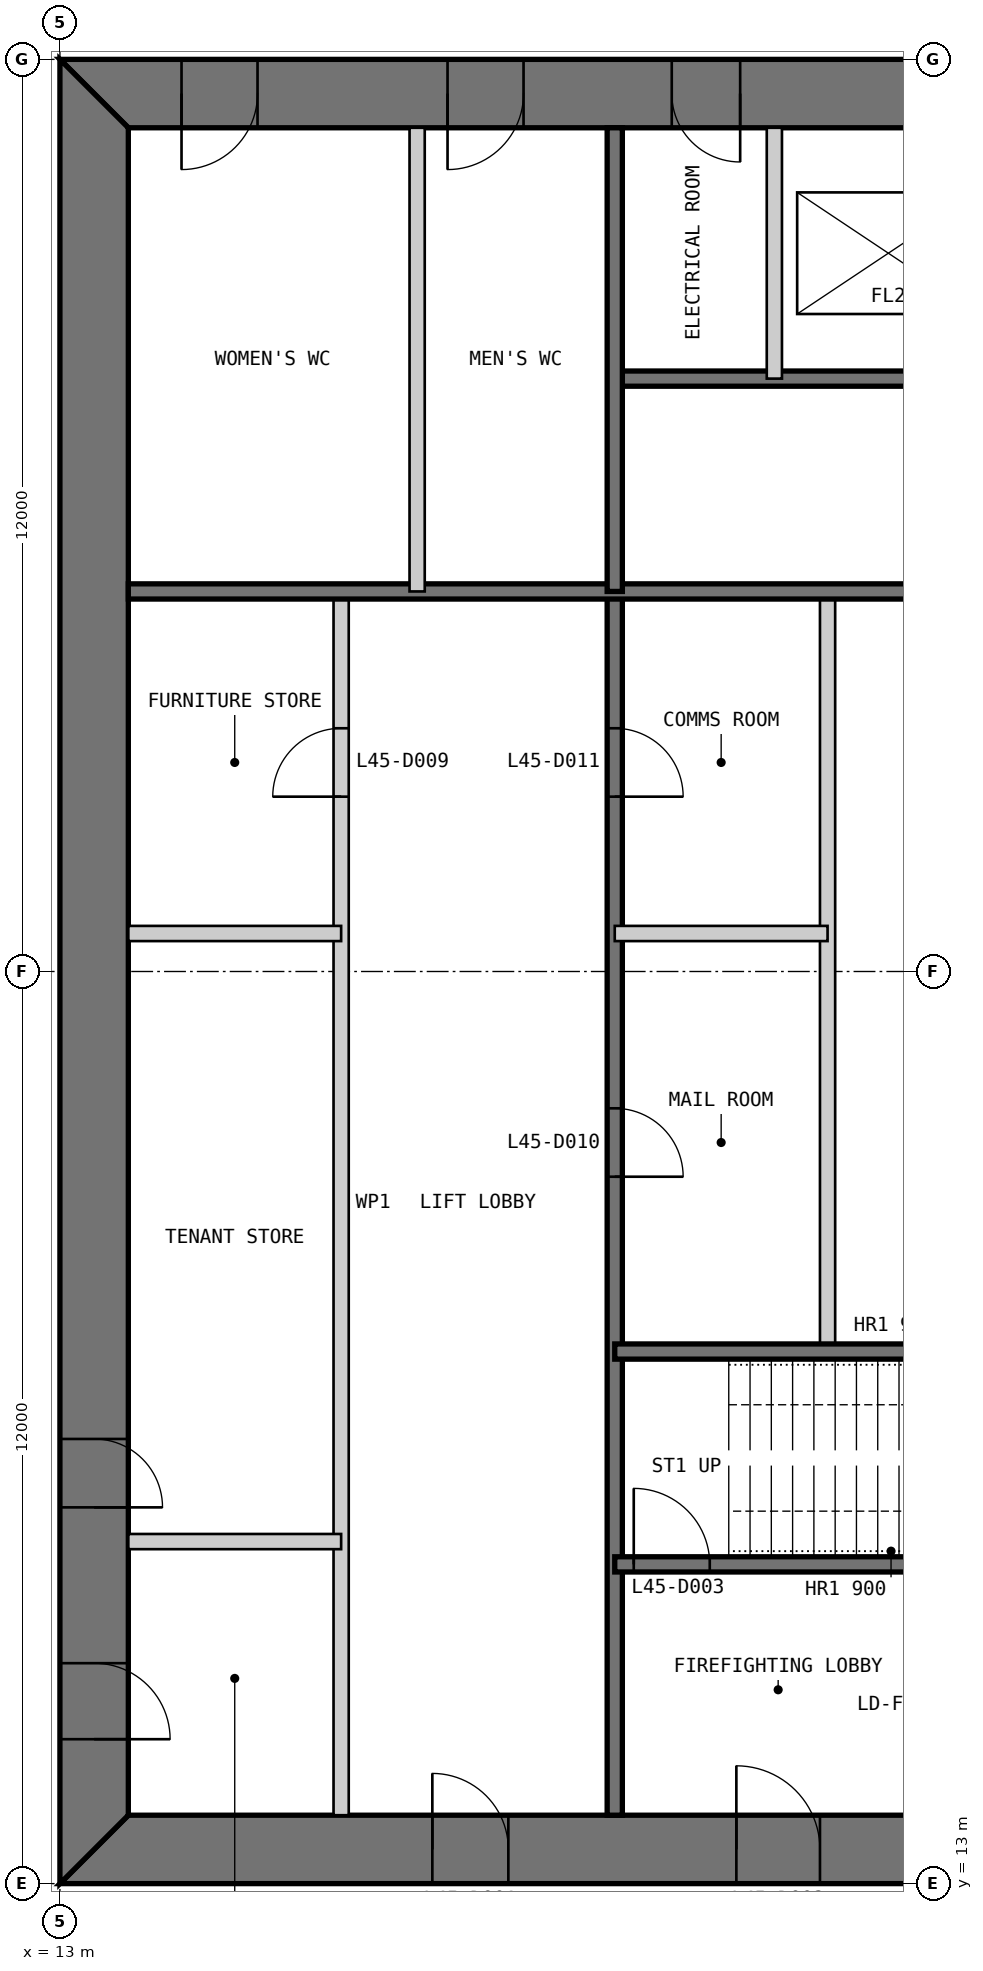
"""IFC4 building model, lengths in metres.
Left out: names, types, materials, properties, quantities, classifications, styles, units other than length and angle.
Written with IfcOpenShell. Run it as: python <this file> out.ifc"""

import sys

from ifc_helpers import new_model, si_unit, direction, frame, frame_2d, origin, place, context, subcontext, project, spatial, polyline, rectangle, outline, extrude, element, fill, save


model = new_model("IFC4")
c1 = context("Model", 3, precision=1e-05, world=origin(), true_north=direction((0.0, 1.0)))
c2 = subcontext(c1, "Body", "Model", "MODEL_VIEW")
j1 = project(units=[si_unit("LENGTHUNIT", "METRE"), si_unit("PLANEANGLEUNIT", "RADIAN")], contexts=[c1])
p1 = place(None, origin())
s1 = spatial("IfcSite", under=j1, at=p1, CompositionType="ELEMENT")
p2 = place(p1, origin())
s2 = spatial("IfcBuilding", under=s1, at=p2, CompositionType="ELEMENT")
p3 = place(p2, frame((0.0, 0.0, 193.8)))
s3 = spatial("IfcBuildingStorey", under=s2, at=p3, CompositionType="ELEMENT", Elevation=193.8)
p4 = place(p3, frame((13.0, 13.45, 0.0), z_axis=(0.0, 0.0, 1.0), x_axis=(1.0, 0.0, 0.0)))
e1 = element("IfcWall", 1, at=p4, inside=s3, PredefinedType="SHEAR", context=c2, shape_type="SweptSolid", body=[
    extrude(outline(polyline([(0.0, -0.45), (24.0, -0.45), (23.1, 0.45), (0.9, 0.45), (0.0, -0.45)])), origin(), (0.0, 0.0, 1.0), 4.0),
])
p5 = place(p4, frame((4.9, 0.0, 0.0)))
e2 = element("IfcOpeningElement", 2, at=p5, cuts=e1, PredefinedType="OPENING", context=c2, shape_type="SweptSolid", body=[
    extrude(rectangle(XDim=1.0, YDim=2.2, at=frame_2d((0.5, 1.1))), frame((0.0, 0.46, 0.0), z_axis=(0.0, -1.0, 0.0), x_axis=(1.0, 0.0, 0.0)), (0.0, 0.0, 1.0), 0.92),
])
p6 = place(p4, frame((8.9, 0.0, 0.0)))
e3 = element("IfcOpeningElement", 3, at=p6, cuts=e1, PredefinedType="OPENING", context=c2, shape_type="SweptSolid", body=[
    extrude(rectangle(XDim=1.1, YDim=2.2, at=frame_2d((0.55, 1.1))), frame((0.0, 0.46, 0.0), z_axis=(0.0, -1.0, 0.0), x_axis=(1.0, 0.0, 0.0)), (0.0, 0.0, 1.0), 0.92),
])
p7 = place(p4, frame((15.05, 0.0, 0.0)))
e4 = element("IfcOpeningElement", 4, at=p7, cuts=e1, PredefinedType="OPENING", context=c2, shape_type="SweptSolid", body=[
    extrude(rectangle(XDim=0.9, YDim=2.2, at=frame_2d((0.45, 1.1))), frame((0.0, 0.46, 0.0), z_axis=(0.0, -1.0, 0.0), x_axis=(1.0, 0.0, 0.0)), (0.0, 0.0, 1.0), 0.92),
])
p8 = place(p4, frame((17.9, 0.0, 0.0)))
e5 = element("IfcOpeningElement", 5, at=p8, cuts=e1, PredefinedType="OPENING", context=c2, shape_type="SweptSolid", body=[
    extrude(rectangle(XDim=1.0, YDim=2.2, at=frame_2d((0.5, 1.1))), frame((0.0, 0.46, 0.0), z_axis=(0.0, -1.0, 0.0), x_axis=(1.0, 0.0, 0.0)), (0.0, 0.0, 1.0), 0.92),
])
p9 = place(p4, frame((21.4, 0.0, 0.0)))
e6 = element("IfcOpeningElement", 6, at=p9, cuts=e1, PredefinedType="OPENING", context=c2, shape_type="SweptSolid", body=[
    extrude(rectangle(XDim=1.0, YDim=2.2, at=frame_2d((0.5, 1.1))), frame((0.0, 0.46, 0.0), z_axis=(0.0, -1.0, 0.0), x_axis=(1.0, 0.0, 0.0)), (0.0, 0.0, 1.0), 0.92),
])
p10 = place(p3, frame((37.0, 36.55, 0.0), z_axis=(0.0, 0.0, 1.0), x_axis=(-1.0, 0.0, 0.0)))
e7 = element("IfcWall", 7, at=p10, inside=s3, PredefinedType="SHEAR", context=c2, shape_type="SweptSolid", body=[
    extrude(outline(polyline([(0.0, -0.45), (24.0, -0.45), (23.1, 0.45), (0.9, 0.45), (0.0, -0.45)])), origin(), (0.0, 0.0, 1.0), 4.0),
])
p11 = place(p10, frame((4.9, 0.0, 0.0)))
e8 = element("IfcOpeningElement", 8, at=p11, cuts=e7, PredefinedType="OPENING", context=c2, shape_type="SweptSolid", body=[
    extrude(rectangle(XDim=1.0, YDim=2.2, at=frame_2d((0.5, 1.1))), frame((0.0, 0.46, 0.0), z_axis=(0.0, -1.0, 0.0), x_axis=(1.0, 0.0, 0.0)), (0.0, 0.0, 1.0), 0.92),
])
p12 = place(p10, frame((8.9, 0.0, 0.0)))
e9 = element("IfcOpeningElement", 9, at=p12, cuts=e7, PredefinedType="OPENING", context=c2, shape_type="SweptSolid", body=[
    extrude(rectangle(XDim=1.1, YDim=2.2, at=frame_2d((0.55, 1.1))), frame((0.0, 0.46, 0.0), z_axis=(0.0, -1.0, 0.0), x_axis=(1.0, 0.0, 0.0)), (0.0, 0.0, 1.0), 0.92),
])
p13 = place(p10, frame((15.05, 0.0, 0.0)))
e10 = element("IfcOpeningElement", 10, at=p13, cuts=e7, PredefinedType="OPENING", context=c2, shape_type="SweptSolid", body=[
    extrude(rectangle(XDim=0.9, YDim=2.2, at=frame_2d((0.45, 1.1))), frame((0.0, 0.46, 0.0), z_axis=(0.0, -1.0, 0.0), x_axis=(1.0, 0.0, 0.0)), (0.0, 0.0, 1.0), 0.92),
])
p14 = place(p10, frame((17.9, 0.0, 0.0)))
e11 = element("IfcOpeningElement", 11, at=p14, cuts=e7, PredefinedType="OPENING", context=c2, shape_type="SweptSolid", body=[
    extrude(rectangle(XDim=1.0, YDim=2.2, at=frame_2d((0.5, 1.1))), frame((0.0, 0.46, 0.0), z_axis=(0.0, -1.0, 0.0), x_axis=(1.0, 0.0, 0.0)), (0.0, 0.0, 1.0), 0.92),
])
p15 = place(p10, frame((21.4, 0.0, 0.0)))
e12 = element("IfcOpeningElement", 12, at=p15, cuts=e7, PredefinedType="OPENING", context=c2, shape_type="SweptSolid", body=[
    extrude(rectangle(XDim=1.0, YDim=2.2, at=frame_2d((0.5, 1.1))), frame((0.0, 0.46, 0.0), z_axis=(0.0, -1.0, 0.0), x_axis=(1.0, 0.0, 0.0)), (0.0, 0.0, 1.0), 0.92),
])
p16 = place(p3, frame((13.45, 36.1, 0.0), z_axis=(0.0, 0.0, 1.0), x_axis=(0.0, -1.0, 0.0)))
e13 = element("IfcWall", 13, at=p16, inside=s3, PredefinedType="SHEAR", context=c2, shape_type="SweptSolid", body=[
    extrude(outline(polyline([(-0.9, -0.45), (23.1, -0.45), (22.2, 0.45), (0.0, 0.45), (-0.9, -0.45)])), origin(), (0.0, 0.0, 1.0), 4.0),
])
p17 = place(p16, frame((20.2, 0.0, 0.0)))
e14 = element("IfcOpeningElement", 14, at=p17, cuts=e13, PredefinedType="OPENING", context=c2, shape_type="SweptSolid", body=[
    extrude(rectangle(XDim=1.0, YDim=2.2, at=frame_2d((0.5, 1.1))), frame((0.0, 0.46, 0.0), z_axis=(0.0, -1.0, 0.0), x_axis=(1.0, 0.0, 0.0)), (0.0, 0.0, 1.0), 0.92),
])
p18 = place(p16, frame((17.25, 0.0, 0.0)))
e15 = element("IfcOpeningElement", 15, at=p18, cuts=e13, PredefinedType="OPENING", context=c2, shape_type="SweptSolid", body=[
    extrude(rectangle(XDim=0.9, YDim=2.2, at=frame_2d((0.45, 1.1))), frame((0.0, 0.46, 0.0), z_axis=(0.0, -1.0, 0.0), x_axis=(1.0, 0.0, 0.0)), (0.0, 0.0, 1.0), 0.92),
])
p19 = place(p3, frame((16.7, 13.9, 0.0), z_axis=(0.0, 0.0, 1.0), x_axis=(0.0, 1.0, 0.0)))
e16 = element("IfcWall", 16, at=p19, inside=s3, PredefinedType="PARTITIONING", context=c2, shape_type="SweptSolid", body=[
    extrude(rectangle(XDim=16.1, YDim=0.2, at=frame_2d((8.05, 0.0))), origin(), (0.0, 0.0, 1.0), 3.8),
])
p20 = place(p19, frame((13.4, 0.0, 0.0)))
e17 = element("IfcOpeningElement", 17, at=p20, cuts=e16, PredefinedType="OPENING", context=c2, shape_type="SweptSolid", body=[
    extrude(rectangle(XDim=0.9, YDim=2.2, at=frame_2d((0.45, 1.1))), frame((0.0, 0.11, 0.0), z_axis=(0.0, -1.0, 0.0), x_axis=(1.0, 0.0, 0.0)), (0.0, 0.0, 1.0), 0.22),
])
p21 = place(p3, frame((20.3, 13.9, 0.0), z_axis=(0.0, 0.0, 1.0), x_axis=(0.0, 1.0, 0.0)))
e18 = element("IfcWall", 18, at=p21, inside=s3, PredefinedType="SOLIDWALL", context=c2, shape_type="SweptSolid", body=[
    extrude(rectangle(XDim=16.1, YDim=0.2, at=frame_2d((8.05, 0.0))), origin(), (0.0, 0.0, 1.0), 3.8),
])
p22 = place(p21, frame((8.4, 0.0, 0.0)))
e19 = element("IfcOpeningElement", 19, at=p22, cuts=e18, PredefinedType="OPENING", context=c2, shape_type="SweptSolid", body=[
    extrude(rectangle(XDim=0.9, YDim=2.2, at=frame_2d((0.45, 1.1))), frame((0.0, 0.11, 0.0), z_axis=(0.0, -1.0, 0.0), x_axis=(1.0, 0.0, 0.0)), (0.0, 0.0, 1.0), 0.22),
])
p23 = place(p21, frame((13.4, 0.0, 0.0)))
e20 = element("IfcOpeningElement", 20, at=p23, cuts=e18, PredefinedType="OPENING", context=c2, shape_type="SweptSolid", body=[
    extrude(rectangle(XDim=0.9, YDim=2.2, at=frame_2d((0.45, 1.1))), frame((0.0, 0.11, 0.0), z_axis=(0.0, -1.0, 0.0), x_axis=(1.0, 0.0, 0.0)), (0.0, 0.0, 1.0), 0.22),
])
p24 = place(p3, frame((23.1, 20.0, 0.0), z_axis=(0.0, 0.0, 1.0), x_axis=(0.0, 1.0, 0.0)))
e21 = element("IfcWall", 21, at=p24, inside=s3, PredefinedType="PARTITIONING", context=c2, shape_type="SweptSolid", body=[
    extrude(rectangle(XDim=10.0, YDim=0.2, at=frame_2d((5.0, 0.0))), origin(), (0.0, 0.0, 1.0), 3.8),
])
p25 = place(p3, frame((20.3, 17.2, 0.0), z_axis=(0.0, 0.0, 1.0), x_axis=(1.0, 0.0, 0.0)))
e22 = element("IfcWall", 22, at=p25, inside=s3, PredefinedType="SOLIDWALL", context=c2, shape_type="SweptSolid", body=[
    extrude(rectangle(XDim=9.4, YDim=0.2, at=frame_2d((4.7, 0.0))), origin(), (0.0, 0.0, 1.0), 3.8),
])
p26 = place(p25, frame((0.25, 0.0, 0.0)))
e23 = element("IfcOpeningElement", 23, at=p26, cuts=e22, PredefinedType="OPENING", context=c2, shape_type="SweptSolid", body=[
    extrude(rectangle(XDim=1.0, YDim=2.2, at=frame_2d((0.5, 1.1))), frame((0.0, 0.11, 0.0), z_axis=(0.0, -1.0, 0.0), x_axis=(1.0, 0.0, 0.0)), (0.0, 0.0, 1.0), 0.22),
])
p27 = place(p3, frame((20.3, 20.0, 0.0), z_axis=(0.0, 0.0, 1.0), x_axis=(1.0, 0.0, 0.0)))
e24 = element("IfcWall", 24, at=p27, inside=s3, PredefinedType="SOLIDWALL", context=c2, shape_type="SweptSolid", body=[
    extrude(rectangle(XDim=15.8, YDim=0.2, at=frame_2d((7.9, 0.0))), origin(), (0.0, 0.0, 1.0), 3.8),
])
for number, where, z_axis, x_axis in (
    (25, (13.9, 17.5, 0.0), (0.0, 0.0, 1.0), (1.0, 0.0, 0.0)),
    (26, (13.9, 25.5, 0.0), (0.0, 0.0, 1.0), (1.0, 0.0, 0.0)),
    (27, (20.3, 25.5, 0.0), (0.0, 0.0, 1.0), (1.0, 0.0, 0.0)),
):
    element("IfcWall", number, at=place(p3, frame(where, z_axis=z_axis, x_axis=x_axis)), inside=s3, PredefinedType="PARTITIONING", context=c2, shape_type="SweptSolid", body=[
        extrude(rectangle(XDim=2.8, YDim=0.2, at=frame_2d((1.4, 0.0))), origin(), (0.0, 0.0, 1.0), 3.8),
    ])
p28 = place(p3, frame((29.7, 32.8, 0.0), z_axis=(0.0, 0.0, 1.0), x_axis=(-1.0, 0.0, 0.0)))
e28 = element("IfcWall", 28, at=p28, inside=s3, PredefinedType="SOLIDWALL", context=c2, shape_type="SweptSolid", body=[
    extrude(rectangle(XDim=9.4, YDim=0.2, at=frame_2d((4.7, 0.0))), origin(), (0.0, 0.0, 1.0), 3.8),
])
p29 = place(p28, frame((0.25, 0.0, 0.0)))
e29 = element("IfcOpeningElement", 29, at=p29, cuts=e28, PredefinedType="OPENING", context=c2, shape_type="SweptSolid", body=[
    extrude(rectangle(XDim=1.0, YDim=2.2, at=frame_2d((0.5, 1.1))), frame((0.0, 0.11, 0.0), z_axis=(0.0, -1.0, 0.0), x_axis=(1.0, 0.0, 0.0)), (0.0, 0.0, 1.0), 0.22),
])
p30 = place(p3, frame((29.7, 30.0, 0.0), z_axis=(0.0, 0.0, 1.0), x_axis=(-1.0, 0.0, 0.0)))
e30 = element("IfcWall", 30, at=p30, inside=s3, PredefinedType="SOLIDWALL", context=c2, shape_type="SweptSolid", body=[
    extrude(rectangle(XDim=15.8, YDim=0.2, at=frame_2d((7.9, 0.0))), origin(), (0.0, 0.0, 1.0), 3.8),
])
p31 = place(p3, frame((22.4, 36.1, 0.0), z_axis=(0.0, 0.0, 1.0), x_axis=(0.0, -1.0, 0.0)))
e31 = element("IfcWall", 31, at=p31, inside=s3, PredefinedType="PARTITIONING", context=c2, shape_type="SweptSolid", body=[
    extrude(rectangle(XDim=3.3, YDim=0.2, at=frame_2d((1.65, 0.0))), origin(), (0.0, 0.0, 1.0), 3.8),
])
p32 = place(p3, frame((20.3, 36.1, 0.0), z_axis=(0.0, 0.0, 1.0), x_axis=(0.0, -1.0, 0.0)))
e32 = element("IfcWall", 32, at=p32, inside=s3, PredefinedType="SOLIDWALL", context=c2, shape_type="SweptSolid", body=[
    extrude(rectangle(XDim=6.1, YDim=0.2, at=frame_2d((3.05, 0.0))), origin(), (0.0, 0.0, 1.0), 3.8),
])
p33 = place(p3, frame((17.7, 36.1, 0.0), z_axis=(0.0, 0.0, 1.0), x_axis=(0.0, -1.0, 0.0)))
e33 = element("IfcWall", 33, at=p33, inside=s3, PredefinedType="PARTITIONING", context=c2, shape_type="SweptSolid", body=[
    extrude(rectangle(XDim=6.1, YDim=0.2, at=frame_2d((3.05, 0.0))), origin(), (0.0, 0.0, 1.0), 3.8),
])
p34 = place(p5, origin())
e34 = element("IfcDoor", 34, at=p34, inside=s3, OperationType="SINGLE_SWING_LEFT", PredefinedType="DOOR", context=c2, shape_type="SweptSolid", body=[
    extrude(rectangle(XDim=1.0, YDim=2.2, at=frame_2d((0.5, 1.1))), frame((0.0, 0.025, 0.0), z_axis=(0.0, -1.0, 0.0), x_axis=(1.0, 0.0, 0.0)), (0.0, 0.0, 1.0), 0.05),
    extrude(outline(polyline([(0.0, 0.0), (0.04, 0.0), (0.04, 2.16), (0.96, 2.16), (0.96, 0.0), (1.0, 0.0), (1.0, 2.2), (0.0, 2.2), (0.0, 0.0)])), frame((0.0, 0.3, 0.0), z_axis=(0.0, -1.0, 0.0), x_axis=(1.0, 0.0, 0.0)), (0.0, 0.0, 1.0), 0.6),
])
fill(e2, e34)
p35 = place(p6, origin())
e35 = element("IfcDoor", 35, at=p35, inside=s3, OperationType="SINGLE_SWING_LEFT", PredefinedType="DOOR", context=c2, shape_type="SweptSolid", body=[
    extrude(rectangle(XDim=1.1, YDim=2.2, at=frame_2d((0.55, 1.1))), frame((0.0, 0.025, 0.0), z_axis=(0.0, -1.0, 0.0), x_axis=(1.0, 0.0, 0.0)), (0.0, 0.0, 1.0), 0.05),
    extrude(outline(polyline([(0.0, 0.0), (0.04, 0.0), (0.04, 2.16), (1.06, 2.16), (1.06, 0.0), (1.1, 0.0), (1.1, 2.2), (0.0, 2.2), (0.0, 0.0)])), frame((0.0, 0.3, 0.0), z_axis=(0.0, -1.0, 0.0), x_axis=(1.0, 0.0, 0.0)), (0.0, 0.0, 1.0), 0.6),
])
fill(e3, e35)
p36 = place(p26, origin())
e36 = element("IfcDoor", 36, at=p36, inside=s3, OperationType="SINGLE_SWING_LEFT", PredefinedType="DOOR", context=c2, shape_type="SweptSolid", body=[
    extrude(rectangle(XDim=1.0, YDim=2.2, at=frame_2d((0.5, 1.1))), frame((0.0, 0.025, 0.0), z_axis=(0.0, -1.0, 0.0), x_axis=(1.0, 0.0, 0.0)), (0.0, 0.0, 1.0), 0.05),
])
fill(e23, e36)
p37 = place(p17, origin())
e37 = element("IfcDoor", 37, at=p37, inside=s3, OperationType="SINGLE_SWING_RIGHT", PredefinedType="DOOR", context=c2, shape_type="SweptSolid", body=[
    extrude(rectangle(XDim=1.0, YDim=2.2, at=frame_2d((0.5, 1.1))), frame((0.0, 0.025, 0.0), z_axis=(0.0, -1.0, 0.0), x_axis=(1.0, 0.0, 0.0)), (0.0, 0.0, 1.0), 0.05),
    extrude(outline(polyline([(0.0, 0.0), (0.04, 0.0), (0.04, 2.16), (0.96, 2.16), (0.96, 0.0), (1.0, 0.0), (1.0, 2.2), (0.0, 2.2), (0.0, 0.0)])), frame((0.0, 0.3, 0.0), z_axis=(0.0, -1.0, 0.0), x_axis=(1.0, 0.0, 0.0)), (0.0, 0.0, 1.0), 0.6),
])
fill(e14, e37)
p38 = place(p18, origin())
e38 = element("IfcDoor", 38, at=p38, inside=s3, OperationType="SINGLE_SWING_RIGHT", PredefinedType="DOOR", context=c2, shape_type="SweptSolid", body=[
    extrude(rectangle(XDim=0.9, YDim=2.2, at=frame_2d((0.45, 1.1))), frame((0.0, 0.025, 0.0), z_axis=(0.0, -1.0, 0.0), x_axis=(1.0, 0.0, 0.0)), (0.0, 0.0, 1.0), 0.05),
    extrude(outline(polyline([(0.0, 0.0), (0.04, 0.0), (0.04, 2.16), (0.86, 2.16), (0.86, 0.0), (0.9, 0.0), (0.9, 2.2), (0.0, 2.2), (0.0, 0.0)])), frame((0.0, 0.3, 0.0), z_axis=(0.0, -1.0, 0.0), x_axis=(1.0, 0.0, 0.0)), (0.0, 0.0, 1.0), 0.6),
])
fill(e15, e38)
p39 = place(p20, origin())
e39 = element("IfcDoor", 39, at=p39, inside=s3, OperationType="SINGLE_SWING_LEFT", PredefinedType="DOOR", context=c2, shape_type="SweptSolid", body=[
    extrude(rectangle(XDim=0.9, YDim=2.2, at=frame_2d((0.45, 1.1))), frame((0.0, 0.025, 0.0), z_axis=(0.0, -1.0, 0.0), x_axis=(1.0, 0.0, 0.0)), (0.0, 0.0, 1.0), 0.05),
])
fill(e17, e39)
p40 = place(p22, frame((0.9, 0.0, 0.0), z_axis=(0.0, 0.0, 1.0), x_axis=(-1.0, 0.0, 0.0)))
e40 = element("IfcDoor", 40, at=p40, inside=s3, OperationType="SINGLE_SWING_RIGHT", PredefinedType="DOOR", context=c2, shape_type="SweptSolid", body=[
    extrude(rectangle(XDim=0.9, YDim=2.2, at=frame_2d((0.45, 1.1))), frame((0.0, 0.025, 0.0), z_axis=(0.0, -1.0, 0.0), x_axis=(1.0, 0.0, 0.0)), (0.0, 0.0, 1.0), 0.05),
])
fill(e19, e40)
p41 = place(p23, frame((0.9, 0.0, 0.0), z_axis=(0.0, 0.0, 1.0), x_axis=(-1.0, 0.0, 0.0)))
e41 = element("IfcDoor", 41, at=p41, inside=s3, OperationType="SINGLE_SWING_RIGHT", PredefinedType="DOOR", context=c2, shape_type="SweptSolid", body=[
    extrude(rectangle(XDim=0.9, YDim=2.2, at=frame_2d((0.45, 1.1))), frame((0.0, 0.025, 0.0), z_axis=(0.0, -1.0, 0.0), x_axis=(1.0, 0.0, 0.0)), (0.0, 0.0, 1.0), 0.05),
])
fill(e20, e41)
p42 = place(p13, origin())
e42 = element("IfcDoor", 42, at=p42, inside=s3, OperationType="SINGLE_SWING_LEFT", PredefinedType="DOOR", context=c2, shape_type="SweptSolid", body=[
    extrude(rectangle(XDim=0.9, YDim=2.2, at=frame_2d((0.45, 1.1))), frame((0.0, 0.025, 0.0), z_axis=(0.0, -1.0, 0.0), x_axis=(1.0, 0.0, 0.0)), (0.0, 0.0, 1.0), 0.05),
    extrude(outline(polyline([(0.0, 0.0), (0.04, 0.0), (0.04, 2.16), (0.86, 2.16), (0.86, 0.0), (0.9, 0.0), (0.9, 2.2), (0.0, 2.2), (0.0, 0.0)])), frame((0.0, 0.3, 0.0), z_axis=(0.0, -1.0, 0.0), x_axis=(1.0, 0.0, 0.0)), (0.0, 0.0, 1.0), 0.6),
])
fill(e10, e42)
p43 = place(p14, origin())
e43 = element("IfcDoor", 43, at=p43, inside=s3, OperationType="SINGLE_SWING_RIGHT", PredefinedType="DOOR", context=c2, shape_type="SweptSolid", body=[
    extrude(rectangle(XDim=1.0, YDim=2.2, at=frame_2d((0.5, 1.1))), frame((0.0, 0.025, 0.0), z_axis=(0.0, -1.0, 0.0), x_axis=(1.0, 0.0, 0.0)), (0.0, 0.0, 1.0), 0.05),
    extrude(outline(polyline([(0.0, 0.0), (0.04, 0.0), (0.04, 2.16), (0.96, 2.16), (0.96, 0.0), (1.0, 0.0), (1.0, 2.2), (0.0, 2.2), (0.0, 0.0)])), frame((0.0, 0.3, 0.0), z_axis=(0.0, -1.0, 0.0), x_axis=(1.0, 0.0, 0.0)), (0.0, 0.0, 1.0), 0.6),
])
fill(e11, e43)
p44 = place(p15, origin())
e44 = element("IfcDoor", 44, at=p44, inside=s3, OperationType="SINGLE_SWING_RIGHT", PredefinedType="DOOR", context=c2, shape_type="SweptSolid", body=[
    extrude(rectangle(XDim=1.0, YDim=2.2, at=frame_2d((0.5, 1.1))), frame((0.0, 0.025, 0.0), z_axis=(0.0, -1.0, 0.0), x_axis=(1.0, 0.0, 0.0)), (0.0, 0.0, 1.0), 0.05),
    extrude(outline(polyline([(0.0, 0.0), (0.04, 0.0), (0.04, 2.16), (0.96, 2.16), (0.96, 0.0), (1.0, 0.0), (1.0, 2.2), (0.0, 2.2), (0.0, 0.0)])), frame((0.0, 0.3, 0.0), z_axis=(0.0, -1.0, 0.0), x_axis=(1.0, 0.0, 0.0)), (0.0, 0.0, 1.0), 0.6),
])
fill(e12, e44)
save(model, sys.argv[1])
